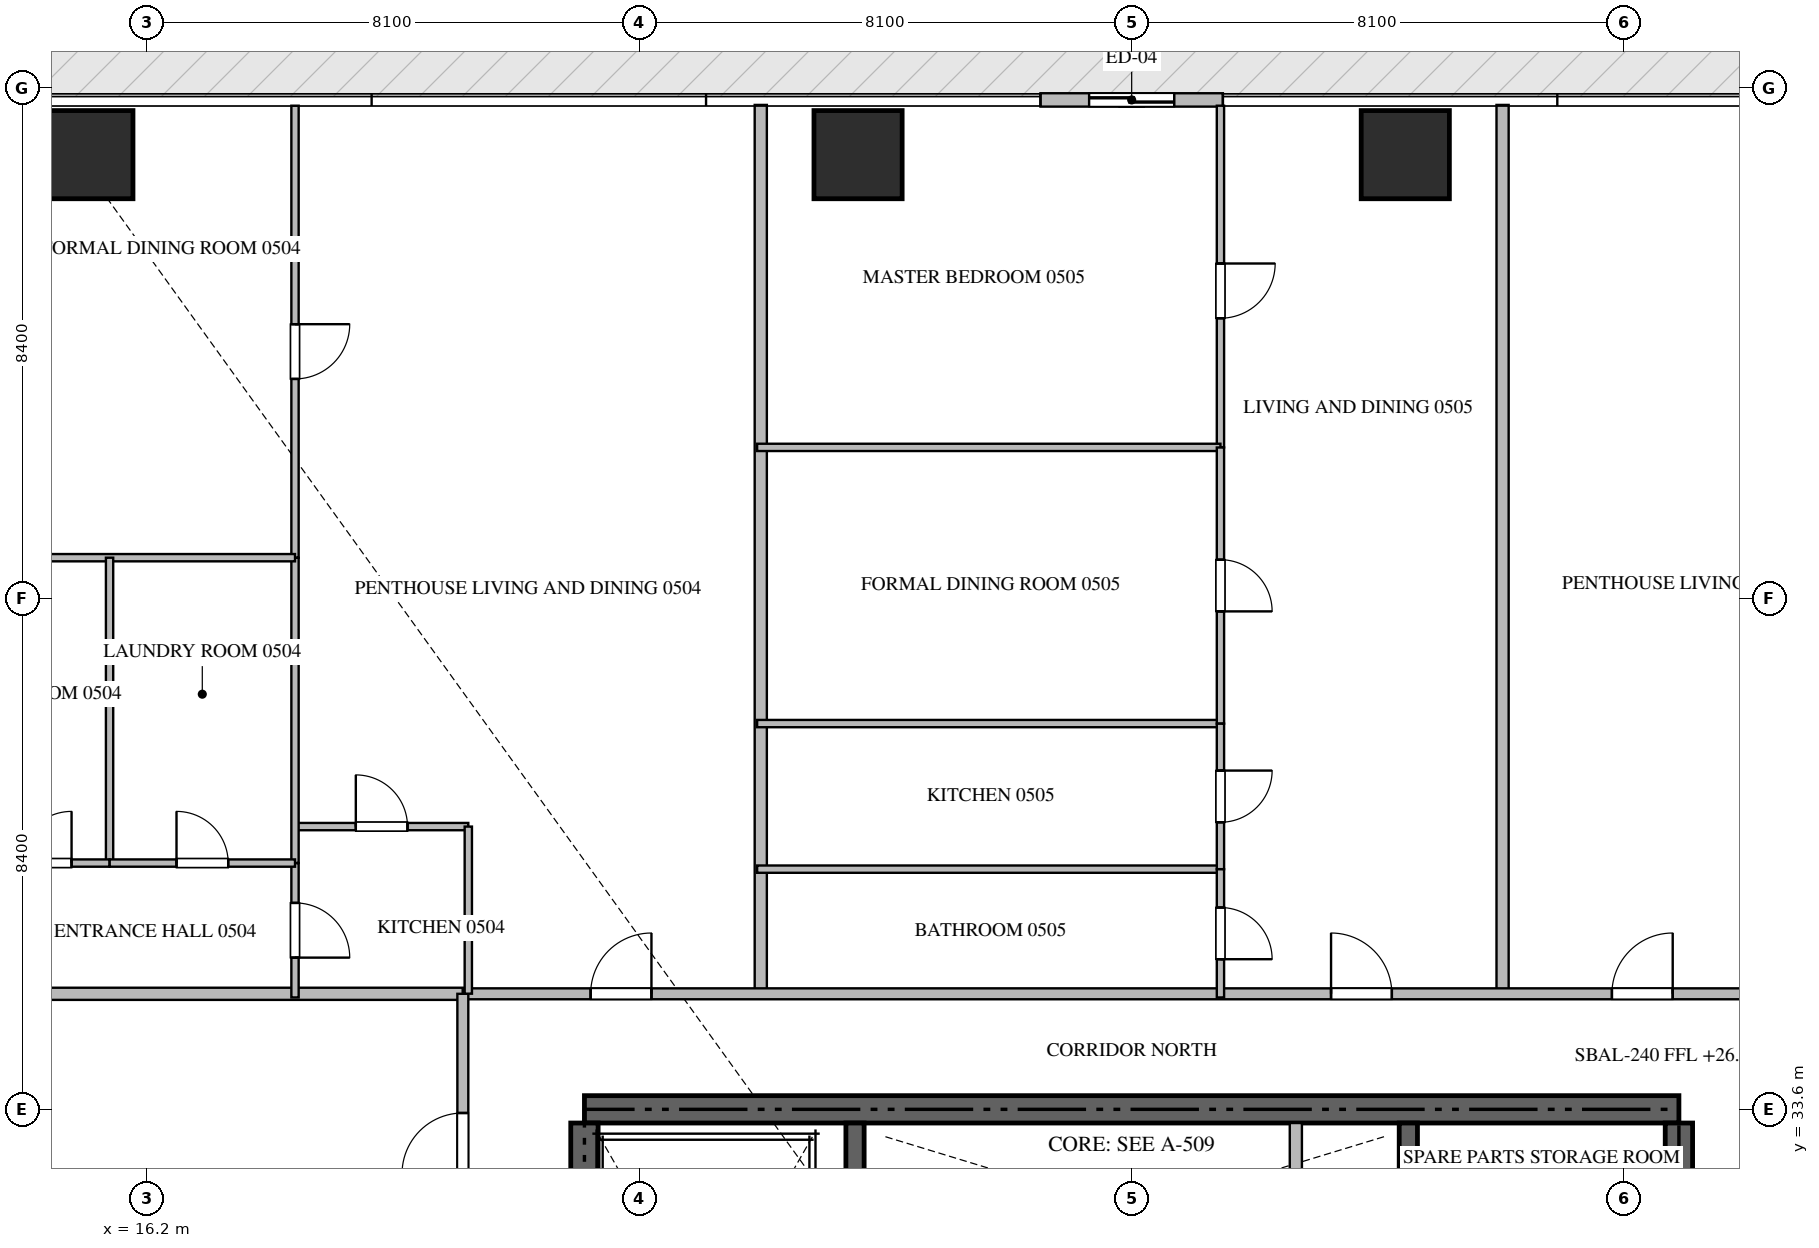
"""IFC4 building model, lengths in metres.
Left out: names, types, materials, properties, quantities, classifications, styles, units other than length and angle.
Written with IfcOpenShell. Run it as: python <this file> out.ifc"""

import sys

from ifc_helpers import new_model, si_unit, direction, frame, frame_2d, origin, origin_2d, place, context, subcontext, project, spatial, rectangle, extrude, source, transform, mapped, element, fill, save


model = new_model("IFC4")
c1 = context("Model", 3, precision=1e-05, world=origin(), true_north=direction((0.0, 1.0)))
c2 = subcontext(c1, "Body", "Model", "MODEL_VIEW")
j1 = project(units=[si_unit("LENGTHUNIT", "METRE"), si_unit("PLANEANGLEUNIT", "RADIAN")], contexts=[c1])
p1 = place(None, origin())
s1 = spatial("IfcSite", under=j1, at=p1, CompositionType="ELEMENT")
p2 = place(p1, origin())
s2 = spatial("IfcBuilding", under=s1, at=p2, CompositionType="ELEMENT")
p3 = place(p2, frame((0.0, 0.0, 26.7)))
s3 = spatial("IfcBuildingStorey", under=s2, at=p3, CompositionType="ELEMENT", Elevation=26.7)
p4 = place(p3, frame((41.4, 33.6, -0.44), z_axis=(0.0, 0.0, 1.0), x_axis=(-1.0, 0.0, 0.0)))
e1 = element("IfcWall", 1, at=p4, inside=s3, PredefinedType="SHEAR", context=c2, shape_type="SweptSolid", body=[
    extrude(rectangle(XDim=18.0, YDim=0.45, at=frame_2d((9.0, 0.0))), origin(), (0.0, 0.0, 1.0), 3.928),
])
p5 = place(p3, frame((23.4, 24.25, -0.44), z_axis=(0.0, 0.0, 1.0), x_axis=(0.0, 1.0, 0.0)))
e2 = element("IfcWall", 2, at=p5, inside=s3, PredefinedType="SHEAR", context=c2, shape_type="SweptSolid", body=[
    extrude(rectangle(XDim=9.125, YDim=0.45, at=frame_2d((4.562, 0.0))), origin(), (0.0, 0.0, 1.0), 3.928),
])
p6 = place(p3, frame((41.4, 27.75, -0.44), z_axis=(0.0, 0.0, 1.0), x_axis=(0.0, 1.0, 0.0)))
e3 = element("IfcWall", 3, at=p6, inside=s3, PredefinedType="SHEAR", context=c2, shape_type="SweptSolid", body=[
    extrude(rectangle(XDim=5.625, YDim=0.45, at=frame_2d((2.812, 0.0))), origin(), (0.0, 0.0, 1.0), 3.928),
])
p7 = place(p3, frame((27.85, 23.55, -0.44), z_axis=(0.0, 0.0, 1.0), x_axis=(0.0, 1.0, 0.0)))
e4 = element("IfcWall", 4, at=p7, inside=s3, PredefinedType="SHEAR", context=c2, shape_type="SweptSolid", body=[
    extrude(rectangle(XDim=9.825, YDim=0.3, at=frame_2d((4.913, 0.0))), origin(), (0.0, 0.0, 1.0), 3.928),
])
p8 = place(p3, frame((36.95, 27.05, -0.44), z_axis=(0.0, 0.0, 1.0), x_axis=(0.0, 1.0, 0.0)))
e5 = element("IfcWall", 5, at=p8, inside=s3, PredefinedType="SHEAR", context=c2, shape_type="SweptSolid", body=[
    extrude(rectangle(XDim=6.325, YDim=0.3, at=frame_2d((3.163, 0.0))), origin(), (0.0, 0.0, 1.0), 3.928),
])
m1 = source(origin(), c2, "Body", "SweptSolid", [
    extrude(rectangle(XDim=1.45, YDim=1.45, at=origin_2d()), origin(), (0.0, 0.0, 1.0), 3.93),
])
for number, where, z_axis, x_axis in (
    (6, (15.25, 49.3, -0.44), (0.0, 0.0, 1.0), (1.0, 0.0, 0.0)),
    (7, (27.9, 49.3, -0.44), (0.0, 0.0, 1.0), (1.0, 0.0, 0.0)),
    (8, (36.9, 49.3, -0.44), (0.0, 0.0, 1.0), (1.0, 0.0, 0.0)),
):
    element("IfcColumn", number, at=place(p3, frame(where, z_axis=z_axis, x_axis=x_axis)), inside=s3, PredefinedType="COLUMN", context=c2, shape_type="MappedRepresentation", body=[
        mapped(m1, transform((0.0, 0.0, 0.0), scale=1.0)),
    ])
p9 = place(p3, frame((33.9, 50.2, 0.0), z_axis=(0.0, 0.0, 1.0), x_axis=(-1.0, 0.0, 0.0)))
e9 = element("IfcWall", 9, at=p9, inside=s3, PredefinedType="ELEMENTEDWALL", context=c2, shape_type="SweptSolid", body=[
    extrude(rectangle(XDim=3.0, YDim=0.22, at=frame_2d((1.5, 0.0))), origin(), (0.0, 0.0, 1.0), 3.475),
])
p10 = place(p9, frame((0.8, 0.0, 0.0)))
e10 = element("IfcOpeningElement", 10, at=p10, cuts=e9, PredefinedType="OPENING", context=c2, shape_type="SweptSolid", body=[
    extrude(rectangle(XDim=1.4, YDim=2.25, at=frame_2d((0.7, 1.125))), frame((0.0, 0.12, 0.0), z_axis=(0.0, -1.0, 0.0), x_axis=(1.0, 0.0, 0.0)), (0.0, 0.0, 1.0), 0.24),
])
p11 = place(p3, frame((35.1, 30.75, 0.0), z_axis=(0.0, 0.0, 1.0), x_axis=(0.0, 1.0, 0.0)))
e11 = element("IfcWall", 11, at=p11, inside=s3, PredefinedType="STANDARD", context=c2, shape_type="SweptSolid", body=[
    extrude(rectangle(XDim=2.625, YDim=0.2, at=frame_2d((1.312, 0.0))), origin(), (0.0, 0.0, 1.0), 3.49),
])
for number, where, z_axis, x_axis in (
    (12, (26.3, 35.5, 0.0), (0.0, 0.0, 1.0), (0.0, 1.0, 0.0)),
    (13, (38.5, 35.5, 0.0), (0.0, 0.0, 1.0), (0.0, 1.0, 0.0)),
):
    element("IfcWall", number, at=place(p3, frame(where, z_axis=z_axis, x_axis=x_axis)), inside=s3, PredefinedType="PARTITIONING", context=c2, shape_type="SweptSolid", body=[
        extrude(rectangle(XDim=14.618, YDim=0.2, at=frame_2d((7.309, 0.0))), origin(), (0.0, 0.0, 1.0), 3.49),
    ])
p12 = place(p3, frame((6.082, 35.5, 0.0), z_axis=(0.0, 0.0, 1.0), x_axis=(1.0, 0.0, 0.0)))
e14 = element("IfcWall", 14, at=p12, inside=s3, PredefinedType="PARTITIONING", context=c2, shape_type="SweptSolid", body=[
    extrude(rectangle(XDim=15.318, YDim=0.2, at=frame_2d((7.659, 0.0))), origin(), (0.0, 0.0, 1.0), 3.49),
])
p13 = place(p3, frame((21.402, 35.5, 0.0), z_axis=(0.0, 0.0, 1.0), x_axis=(1.0, 0.0, 0.0)))
e15 = element("IfcWall", 15, at=p13, inside=s3, PredefinedType="PARTITIONING", context=c2, shape_type="SweptSolid", body=[
    extrude(rectangle(XDim=21.996, YDim=0.18, at=frame_2d((10.998, 0.0))), origin(), (0.0, 0.0, 1.0), 3.49),
])
p14 = place(p13, frame((2.1, 0.0, 0.0)))
e16 = element("IfcOpeningElement", 16, at=p14, cuts=e15, PredefinedType="OPENING", context=c2, shape_type="SweptSolid", body=[
    extrude(rectangle(XDim=1.0, YDim=2.15, at=frame_2d((0.5, 1.075))), frame((0.0, 0.1, 0.0), z_axis=(0.0, -1.0, 0.0), x_axis=(1.0, 0.0, 0.0)), (0.0, 0.0, 1.0), 0.2),
])
p15 = place(p13, frame((14.277, 0.0, 0.0)))
e17 = element("IfcOpeningElement", 17, at=p15, cuts=e15, PredefinedType="OPENING", context=c2, shape_type="SweptSolid", body=[
    extrude(rectangle(XDim=1.0, YDim=2.15, at=frame_2d((0.5, 1.075))), frame((0.0, 0.1, 0.0), z_axis=(0.0, -1.0, 0.0), x_axis=(1.0, 0.0, 0.0)), (0.0, 0.0, 1.0), 0.2),
])
p16 = place(p13, frame((18.896, 0.0, 0.0)))
e18 = element("IfcOpeningElement", 18, at=p16, cuts=e15, PredefinedType="OPENING", context=c2, shape_type="SweptSolid", body=[
    extrude(rectangle(XDim=1.0, YDim=2.15, at=frame_2d((0.5, 1.075))), frame((0.0, 0.1, 0.0), z_axis=(0.0, -1.0, 0.0), x_axis=(1.0, 0.0, 0.0)), (0.0, 0.0, 1.0), 0.2),
])
p17 = place(p3, frame((21.4, 14.9, 0.0), z_axis=(0.0, 0.0, 1.0), x_axis=(0.0, 1.0, 0.0)))
e19 = element("IfcWall", 19, at=p17, inside=s3, PredefinedType="PARTITIONING", context=c2, shape_type="SweptSolid", body=[
    extrude(rectangle(XDim=20.6, YDim=0.18, at=frame_2d((10.3, 0.0))), origin(), (0.0, 0.0, 1.0), 3.49),
])
p18 = place(p17, frame((17.64, 0.0, 0.0)))
e20 = element("IfcOpeningElement", 20, at=p18, cuts=e19, PredefinedType="OPENING", context=c2, shape_type="SweptSolid", body=[
    extrude(rectangle(XDim=1.0, YDim=2.15, at=frame_2d((0.5, 1.075))), frame((0.0, 0.1, 0.0), z_axis=(0.0, -1.0, 0.0), x_axis=(1.0, 0.0, 0.0)), (0.0, 0.0, 1.0), 0.2),
])
p19 = place(p3, frame((18.64, 38.25, 0.0), z_axis=(0.0, 0.0, 1.0), x_axis=(1.0, 0.0, 0.0)))
e21 = element("IfcWall", 21, at=p19, inside=s3, PredefinedType="PARTITIONING", context=c2, shape_type="SweptSolid", body=[
    extrude(rectangle(XDim=2.85, YDim=0.12, at=frame_2d((1.425, 0.0))), origin(), (0.0, 0.0, 1.0), 3.49),
])
p20 = place(p19, frame((1.0, 0.0, 0.0)))
e22 = element("IfcOpeningElement", 22, at=p20, cuts=e21, PredefinedType="OPENING", context=c2, shape_type="SweptSolid", body=[
    extrude(rectangle(XDim=0.85, YDim=2.1, at=frame_2d((0.425, 1.05))), frame((0.0, 0.07, 0.0), z_axis=(0.0, -1.0, 0.0), x_axis=(1.0, 0.0, 0.0)), (0.0, 0.0, 1.0), 0.14),
])
p21 = place(p3, frame((21.49, 38.25, 0.0), z_axis=(0.0, 0.0, 1.0), x_axis=(0.0, -1.0, 0.0)))
e23 = element("IfcWall", 23, at=p21, inside=s3, PredefinedType="PARTITIONING", context=c2, shape_type="SweptSolid", body=[
    extrude(rectangle(XDim=2.748, YDim=0.12, at=frame_2d((1.374, 0.0))), origin(), (0.0, 0.0, 1.0), 3.49),
])
p22 = place(p3, frame((18.64, 37.65, 0.0), z_axis=(0.0, 0.0, 1.0), x_axis=(0.0, -1.0, 0.0)))
e24 = element("IfcWall", 24, at=p22, inside=s3, PredefinedType="PARTITIONING", context=c2, shape_type="SweptSolid", body=[
    extrude(rectangle(XDim=2.21, YDim=0.12, at=frame_2d((1.105, 0.0))), origin(), (0.0, 0.0, 1.0), 3.49),
])
p23 = place(p22, frame((0.655, 0.0, 0.0)))
e25 = element("IfcOpeningElement", 25, at=p23, cuts=e24, PredefinedType="OPENING", context=c2, shape_type="SweptSolid", body=[
    extrude(rectangle(XDim=0.9, YDim=2.1, at=frame_2d((0.45, 1.05))), frame((0.0, 0.07, 0.0), z_axis=(0.0, -1.0, 0.0), x_axis=(1.0, 0.0, 0.0)), (0.0, 0.0, 1.0), 0.14),
])
p24 = place(p3, frame((18.64, 50.105, 0.0), z_axis=(0.0, 0.0, 1.0), x_axis=(0.0, -1.0, 0.0)))
e26 = element("IfcWall", 26, at=p24, inside=s3, PredefinedType="PARTITIONING", context=c2, shape_type="SweptSolid", body=[
    extrude(rectangle(XDim=7.433, YDim=0.12, at=frame_2d((3.716, 0.0))), origin(), (0.0, 0.0, 1.0), 3.49),
])
p25 = place(p24, frame((3.593, 0.0, 0.0)))
e27 = element("IfcOpeningElement", 27, at=p25, cuts=e26, PredefinedType="OPENING", context=c2, shape_type="SweptSolid", body=[
    extrude(rectangle(XDim=0.9, YDim=2.1, at=frame_2d((0.45, 1.05))), frame((0.0, 0.07, 0.0), z_axis=(0.0, -1.0, 0.0), x_axis=(1.0, 0.0, 0.0)), (0.0, 0.0, 1.0), 0.14),
])
p26 = place(p3, frame((18.64, 42.67, 0.0), z_axis=(0.0, 0.0, 1.0), x_axis=(0.0, -1.0, 0.0)))
e28 = element("IfcWall", 28, at=p26, inside=s3, PredefinedType="PARTITIONING", context=c2, shape_type="SweptSolid", body=[
    extrude(rectangle(XDim=5.018, YDim=0.12, at=frame_2d((2.509, 0.0))), origin(), (0.0, 0.0, 1.0), 3.49),
])
p27 = place(p3, frame((13.49, 42.672, 0.0), z_axis=(0.0, 0.0, 1.0), x_axis=(1.0, 0.0, 0.0)))
e29 = element("IfcWall", 29, at=p27, inside=s3, PredefinedType="PARTITIONING", context=c2, shape_type="SweptSolid", body=[
    extrude(rectangle(XDim=5.15, YDim=0.12, at=frame_2d((2.575, 0.0))), origin(), (0.0, 0.0, 1.0), 3.49),
])
p28 = place(p3, frame((15.59, 42.672, 0.0), z_axis=(0.0, 0.0, 1.0), x_axis=(0.0, -1.0, 0.0)))
e30 = element("IfcWall", 30, at=p28, inside=s3, PredefinedType="PARTITIONING", context=c2, shape_type="SweptSolid", body=[
    extrude(rectangle(XDim=5.022, YDim=0.12, at=frame_2d((2.511, 0.0))), origin(), (0.0, 0.0, 1.0), 3.49),
])
p29 = place(p3, frame((13.49, 37.65, 0.0), z_axis=(0.0, 0.0, 1.0), x_axis=(1.0, 0.0, 0.0)))
e31 = element("IfcWall", 31, at=p29, inside=s3, PredefinedType="PARTITIONING", context=c2, shape_type="SweptSolid", body=[
    extrude(rectangle(XDim=2.1, YDim=0.12, at=frame_2d((1.05, 0.0))), origin(), (0.0, 0.0, 1.0), 3.49),
])
p30 = place(p29, frame((0.625, 0.0, 0.0)))
e32 = element("IfcOpeningElement", 32, at=p30, cuts=e31, PredefinedType="OPENING", context=c2, shape_type="SweptSolid", body=[
    extrude(rectangle(XDim=0.85, YDim=2.1, at=frame_2d((0.425, 1.05))), frame((0.0, 0.07, 0.0), z_axis=(0.0, -1.0, 0.0), x_axis=(1.0, 0.0, 0.0)), (0.0, 0.0, 1.0), 0.14),
])
p31 = place(p3, frame((15.592, 37.65, 0.0), z_axis=(0.0, 0.0, 1.0), x_axis=(1.0, 0.0, 0.0)))
e33 = element("IfcWall", 33, at=p31, inside=s3, PredefinedType="PARTITIONING", context=c2, shape_type="SweptSolid", body=[
    extrude(rectangle(XDim=3.048, YDim=0.12, at=frame_2d((1.524, 0.0))), origin(), (0.0, 0.0, 1.0), 3.49),
])
p32 = place(p31, frame((1.099, 0.0, 0.0)))
e34 = element("IfcOpeningElement", 34, at=p32, cuts=e33, PredefinedType="OPENING", context=c2, shape_type="SweptSolid", body=[
    extrude(rectangle(XDim=0.85, YDim=2.1, at=frame_2d((0.425, 1.05))), frame((0.0, 0.07, 0.0), z_axis=(0.0, -1.0, 0.0), x_axis=(1.0, 0.0, 0.0)), (0.0, 0.0, 1.0), 0.14),
])
p33 = place(p3, frame((33.86, 50.105, 0.0), z_axis=(0.0, 0.0, 1.0), x_axis=(0.0, -1.0, 0.0)))
e35 = element("IfcWall", 35, at=p33, inside=s3, PredefinedType="PARTITIONING", context=c2, shape_type="SweptSolid", body=[
    extrude(rectangle(XDim=5.619, YDim=0.12, at=frame_2d((2.81, 0.0))), origin(), (0.0, 0.0, 1.0), 3.49),
])
p34 = place(p33, frame((2.595, 0.0, 0.0)))
e36 = element("IfcOpeningElement", 36, at=p34, cuts=e35, PredefinedType="OPENING", context=c2, shape_type="SweptSolid", body=[
    extrude(rectangle(XDim=0.9, YDim=2.1, at=frame_2d((0.45, 1.05))), frame((0.0, 0.07, 0.0), z_axis=(0.0, -1.0, 0.0), x_axis=(1.0, 0.0, 0.0)), (0.0, 0.0, 1.0), 0.14),
])
for number, where, z_axis, x_axis in (
    (37, (26.24, 44.486, 0.0), (0.0, 0.0, 1.0), (1.0, 0.0, 0.0)),
    (38, (26.24, 39.944, 0.0), (0.0, 0.0, 1.0), (1.0, 0.0, 0.0)),
    (39, (26.24, 37.55, 0.0), (0.0, 0.0, 1.0), (1.0, 0.0, 0.0)),
):
    element("IfcWall", number, at=place(p3, frame(where, z_axis=z_axis, x_axis=x_axis)), inside=s3, PredefinedType="PARTITIONING", context=c2, shape_type="SweptSolid", body=[
        extrude(rectangle(XDim=7.62, YDim=0.12, at=frame_2d((3.81, 0.0))), origin(), (0.0, 0.0, 1.0), 3.49),
    ])
p35 = place(p3, frame((33.86, 44.484, 0.0), z_axis=(0.0, 0.0, 1.0), x_axis=(0.0, -1.0, 0.0)))
e40 = element("IfcWall", 40, at=p35, inside=s3, PredefinedType="PARTITIONING", context=c2, shape_type="SweptSolid", body=[
    extrude(rectangle(XDim=4.54, YDim=0.12, at=frame_2d((2.27, 0.0))), origin(), (0.0, 0.0, 1.0), 3.49),
])
p36 = place(p35, frame((1.845, 0.0, 0.0)))
e41 = element("IfcOpeningElement", 41, at=p36, cuts=e40, PredefinedType="OPENING", context=c2, shape_type="SweptSolid", body=[
    extrude(rectangle(XDim=0.85, YDim=2.1, at=frame_2d((0.425, 1.05))), frame((0.0, 0.07, 0.0), z_axis=(0.0, -1.0, 0.0), x_axis=(1.0, 0.0, 0.0)), (0.0, 0.0, 1.0), 0.14),
])
p37 = place(p3, frame((33.86, 39.942, 0.0), z_axis=(0.0, 0.0, 1.0), x_axis=(0.0, -1.0, 0.0)))
e42 = element("IfcWall", 42, at=p37, inside=s3, PredefinedType="PARTITIONING", context=c2, shape_type="SweptSolid", body=[
    extrude(rectangle(XDim=2.392, YDim=0.12, at=frame_2d((1.196, 0.0))), origin(), (0.0, 0.0, 1.0), 3.49),
])
p38 = place(p37, frame((0.771, 0.0, 0.0)))
e43 = element("IfcOpeningElement", 43, at=p38, cuts=e42, PredefinedType="OPENING", context=c2, shape_type="SweptSolid", body=[
    extrude(rectangle(XDim=0.85, YDim=2.1, at=frame_2d((0.425, 1.05))), frame((0.0, 0.07, 0.0), z_axis=(0.0, -1.0, 0.0), x_axis=(1.0, 0.0, 0.0)), (0.0, 0.0, 1.0), 0.14),
])
p39 = place(p3, frame((33.86, 37.548, 0.0), z_axis=(0.0, 0.0, 1.0), x_axis=(0.0, -1.0, 0.0)))
e44 = element("IfcWall", 44, at=p39, inside=s3, PredefinedType="PARTITIONING", context=c2, shape_type="SweptSolid", body=[
    extrude(rectangle(XDim=2.108, YDim=0.12, at=frame_2d((1.054, 0.0))), origin(), (0.0, 0.0, 1.0), 3.49),
])
p40 = place(p39, frame((0.629, 0.0, 0.0)))
e45 = element("IfcOpeningElement", 45, at=p40, cuts=e44, PredefinedType="OPENING", context=c2, shape_type="SweptSolid", body=[
    extrude(rectangle(XDim=0.85, YDim=2.1, at=frame_2d((0.425, 1.05))), frame((0.0, 0.07, 0.0), z_axis=(0.0, -1.0, 0.0), x_axis=(1.0, 0.0, 0.0)), (0.0, 0.0, 1.0), 0.14),
])
m2 = source(origin(), c2, "Body", "SweptSolid", [
    extrude(rectangle(XDim=1.4, YDim=2.25, at=frame_2d((0.7, 1.125))), frame((0.0, 0.025, 0.0), z_axis=(0.0, -1.0, 0.0), x_axis=(1.0, 0.0, 0.0)), (0.0, 0.0, 1.0), 0.05),
])
p41 = place(p10, origin())
e46 = element("IfcDoor", 46, at=p41, inside=s3, OperationType="SLIDING_TO_LEFT", PredefinedType="DOOR", context=c2, shape_type="MappedRepresentation", body=[
    mapped(m2, transform((0.0, 0.0, 0.0), scale=1.0)),
])
fill(e10, e46)
m3 = source(origin(), c2, "Body", "SweptSolid", [
    extrude(rectangle(XDim=1.0, YDim=2.15, at=frame_2d((0.5, 1.075))), frame((0.0, 0.025, 0.0), z_axis=(0.0, -1.0, 0.0), x_axis=(1.0, 0.0, 0.0)), (0.0, 0.0, 1.0), 0.05),
])
p42 = place(p14, origin())
e47 = element("IfcDoor", 47, at=p42, inside=s3, OperationType="SINGLE_SWING_RIGHT", PredefinedType="DOOR", context=c2, shape_type="MappedRepresentation", body=[
    mapped(m3, transform((0.0, 0.0, 0.0), scale=1.0)),
])
fill(e16, e47)
p43 = place(p15, origin())
e48 = element("IfcDoor", 48, at=p43, inside=s3, OperationType="SINGLE_SWING_LEFT", PredefinedType="DOOR", context=c2, shape_type="MappedRepresentation", body=[
    mapped(m3, transform((0.0, 0.0, 0.0), scale=1.0)),
])
fill(e17, e48)
p44 = place(p16, origin())
e49 = element("IfcDoor", 49, at=p44, inside=s3, OperationType="SINGLE_SWING_RIGHT", PredefinedType="DOOR", context=c2, shape_type="MappedRepresentation", body=[
    mapped(m3, transform((0.0, 0.0, 0.0), scale=1.0)),
])
fill(e18, e49)
p45 = place(p18, origin())
e50 = element("IfcDoor", 50, at=p45, inside=s3, OperationType="SINGLE_SWING_LEFT", PredefinedType="DOOR", context=c2, shape_type="MappedRepresentation", body=[
    mapped(m3, transform((0.0, 0.0, 0.0), scale=1.0)),
])
fill(e20, e50)
m4 = source(origin(), c2, "Body", "SweptSolid", [
    extrude(rectangle(XDim=0.85, YDim=2.1, at=frame_2d((0.425, 1.05))), frame((0.0, 0.025, 0.0), z_axis=(0.0, -1.0, 0.0), x_axis=(1.0, 0.0, 0.0)), (0.0, 0.0, 1.0), 0.05),
])
p46 = place(p20, origin())
e51 = element("IfcDoor", 51, at=p46, inside=s3, OperationType="SINGLE_SWING_LEFT", PredefinedType="DOOR", context=c2, shape_type="MappedRepresentation", body=[
    mapped(m4, transform((0.0, 0.0, 0.0), scale=1.0)),
])
fill(e22, e51)
m5 = source(origin(), c2, "Body", "SweptSolid", [
    extrude(rectangle(XDim=0.9, YDim=2.1, at=frame_2d((0.45, 1.05))), frame((0.0, 0.025, 0.0), z_axis=(0.0, -1.0, 0.0), x_axis=(1.0, 0.0, 0.0)), (0.0, 0.0, 1.0), 0.05),
])
p47 = place(p23, origin())
e52 = element("IfcDoor", 52, at=p47, inside=s3, OperationType="SINGLE_SWING_RIGHT", PredefinedType="DOOR", context=c2, shape_type="MappedRepresentation", body=[
    mapped(m5, transform((0.0, 0.0, 0.0), scale=1.0)),
])
fill(e25, e52)
p48 = place(p25, origin())
e53 = element("IfcDoor", 53, at=p48, inside=s3, OperationType="SINGLE_SWING_LEFT", PredefinedType="DOOR", context=c2, shape_type="MappedRepresentation", body=[
    mapped(m5, transform((0.0, 0.0, 0.0), scale=1.0)),
])
fill(e27, e53)
p49 = place(p30, origin())
e54 = element("IfcDoor", 54, at=p49, inside=s3, OperationType="SINGLE_SWING_RIGHT", PredefinedType="DOOR", context=c2, shape_type="MappedRepresentation", body=[
    mapped(m4, transform((0.0, 0.0, 0.0), scale=1.0)),
])
fill(e32, e54)
p50 = place(p32, origin())
e55 = element("IfcDoor", 55, at=p50, inside=s3, OperationType="SINGLE_SWING_LEFT", PredefinedType="DOOR", context=c2, shape_type="MappedRepresentation", body=[
    mapped(m4, transform((0.0, 0.0, 0.0), scale=1.0)),
])
fill(e34, e55)
p51 = place(p34, origin())
e56 = element("IfcDoor", 56, at=p51, inside=s3, OperationType="SINGLE_SWING_LEFT", PredefinedType="DOOR", context=c2, shape_type="MappedRepresentation", body=[
    mapped(m5, transform((0.0, 0.0, 0.0), scale=1.0)),
])
fill(e36, e56)
p52 = place(p36, origin())
e57 = element("IfcDoor", 57, at=p52, inside=s3, OperationType="SINGLE_SWING_RIGHT", PredefinedType="DOOR", context=c2, shape_type="MappedRepresentation", body=[
    mapped(m4, transform((0.0, 0.0, 0.0), scale=1.0)),
])
fill(e41, e57)
p53 = place(p38, origin())
e58 = element("IfcDoor", 58, at=p53, inside=s3, OperationType="SINGLE_SWING_LEFT", PredefinedType="DOOR", context=c2, shape_type="MappedRepresentation", body=[
    mapped(m4, transform((0.0, 0.0, 0.0), scale=1.0)),
])
fill(e43, e58)
p54 = place(p40, origin())
e59 = element("IfcDoor", 59, at=p54, inside=s3, OperationType="SINGLE_SWING_RIGHT", PredefinedType="DOOR", context=c2, shape_type="MappedRepresentation", body=[
    mapped(m4, transform((0.0, 0.0, 0.0), scale=1.0)),
])
fill(e45, e59)
save(model, sys.argv[1])
